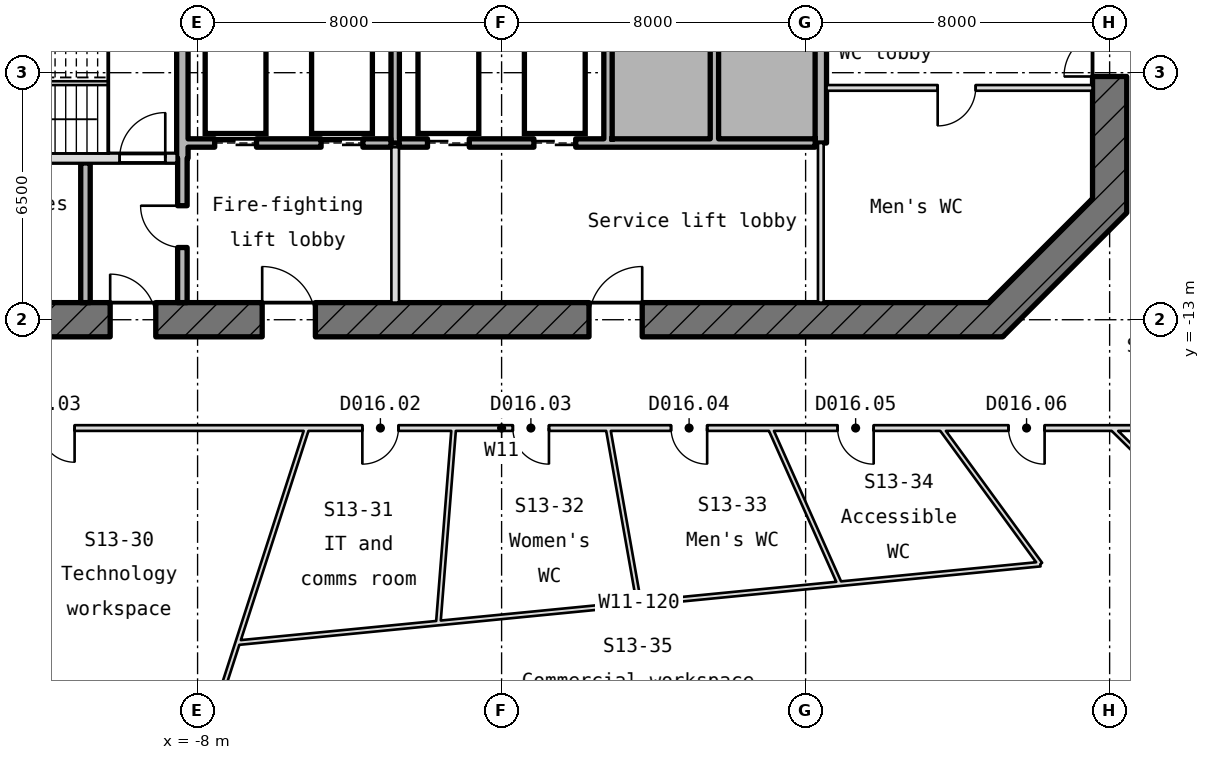
"""IFC4 building model, lengths in metres.
Left out: names, types, materials, properties, quantities, classifications, styles, units other than length and angle.
Written with IfcOpenShell. Run it as: python <this file> out.ifc"""

import sys

from ifc_helpers import new_model, si_unit, direction, frame, frame_2d, origin, place, context, subcontext, project, spatial, rectangle, extrude, element, fill, save


model = new_model("IFC4")
c1 = context("Model", 3, precision=1e-05, world=origin(), true_north=direction((0.0, 1.0)))
c2 = subcontext(c1, "Body", "Model", "MODEL_VIEW")
j1 = project(units=[si_unit("LENGTHUNIT", "METRE"), si_unit("PLANEANGLEUNIT", "RADIAN")], contexts=[c1])
p1 = place(None, origin())
s1 = spatial("IfcSite", under=j1, at=p1, CompositionType="ELEMENT")
p2 = place(p1, origin())
s2 = spatial("IfcBuilding", under=s1, at=p2, CompositionType="ELEMENT")
p3 = place(p2, frame((0.0, 0.0, 198.4)))
s3 = spatial("IfcBuildingStorey", under=s2, at=p3, CompositionType="ELEMENT", Elevation=198.4)
p4 = place(p3, frame((12.868, -13.132, -0.18), z_axis=(0.0, 0.0, 1.0), x_axis=(0.707106781187, 0.707106781187, 0.0)))
e1 = element("IfcWall", 1, at=p4, inside=s3, PredefinedType="SHEAR", context=c2, shape_type="SweptSolid", body=[
    extrude(rectangle(XDim=4.615, YDim=0.9, at=frame_2d((2.308, 0.0))), origin(), (0.0, 0.0, 1.0), 4.15),
])
p5 = place(p3, frame((16.0, -10.186, -0.18), z_axis=(0.0, 0.0, 1.0), x_axis=(0.0, 1.0, 0.0)))
e2 = element("IfcWall", 2, at=p5, inside=s3, PredefinedType="SHEAR", context=c2, shape_type="SweptSolid", body=[
    extrude(rectangle(XDim=20.373, YDim=0.9, at=frame_2d((10.186, 0.0))), origin(), (0.0, 0.0, 1.0), 4.15),
])
p6 = place(p5, frame((8.986, 0.0, 0.18)))
e3 = element("IfcOpeningElement", 3, at=p6, cuts=e2, PredefinedType="OPENING", context=c2, shape_type="SweptSolid", body=[
    extrude(rectangle(XDim=2.4, YDim=2.1, at=frame_2d((1.2, 1.05))), frame((0.0, 0.46, 0.0), z_axis=(0.0, -1.0, 0.0), x_axis=(1.0, 0.0, 0.0)), (0.0, 0.0, 1.0), 0.92),
])
p7 = place(p5, frame((13.586, 0.0, 0.18)))
e4 = element("IfcOpeningElement", 4, at=p7, cuts=e2, PredefinedType="OPENING", context=c2, shape_type="SweptSolid", body=[
    extrude(rectangle(XDim=1.2, YDim=2.1, at=frame_2d((0.6, 1.05))), frame((0.0, 0.46, 0.0), z_axis=(0.0, -1.0, 0.0), x_axis=(1.0, 0.0, 0.0)), (0.0, 0.0, 1.0), 0.92),
])
p8 = place(p5, frame((3.586, 0.0, 0.18)))
e5 = element("IfcOpeningElement", 5, at=p8, cuts=e2, PredefinedType="OPENING", context=c2, shape_type="SweptSolid", body=[
    extrude(rectangle(XDim=1.2, YDim=2.1, at=frame_2d((0.6, 1.05))), frame((0.0, 0.46, 0.0), z_axis=(0.0, -1.0, 0.0), x_axis=(1.0, 0.0, 0.0)), (0.0, 0.0, 1.0), 0.92),
])
p9 = place(p3, frame((-13.186, -13.0, -0.18), z_axis=(0.0, 0.0, 1.0), x_axis=(1.0, 0.0, 0.0)))
e6 = element("IfcWall", 6, at=p9, inside=s3, PredefinedType="SHEAR", context=c2, shape_type="SweptSolid", body=[
    extrude(rectangle(XDim=26.373, YDim=0.9, at=frame_2d((13.186, 0.0))), origin(), (0.0, 0.0, 1.0), 4.15),
])
p10 = place(p9, frame((2.886, 0.0, 0.18)))
e7 = element("IfcOpeningElement", 7, at=p10, cuts=e6, PredefinedType="OPENING", context=c2, shape_type="SweptSolid", body=[
    extrude(rectangle(XDim=1.2, YDim=2.1, at=frame_2d((0.6, 1.05))), frame((0.0, 0.46, 0.0), z_axis=(0.0, -1.0, 0.0), x_axis=(1.0, 0.0, 0.0)), (0.0, 0.0, 1.0), 0.92),
])
p11 = place(p9, frame((6.886, 0.0, 0.18)))
e8 = element("IfcOpeningElement", 8, at=p11, cuts=e6, PredefinedType="OPENING", context=c2, shape_type="SweptSolid", body=[
    extrude(rectangle(XDim=1.4, YDim=2.1, at=frame_2d((0.7, 1.05))), frame((0.0, 0.46, 0.0), z_axis=(0.0, -1.0, 0.0), x_axis=(1.0, 0.0, 0.0)), (0.0, 0.0, 1.0), 0.92),
])
p12 = place(p9, frame((15.486, 0.0, 0.18)))
e9 = element("IfcOpeningElement", 9, at=p12, cuts=e6, PredefinedType="OPENING", context=c2, shape_type="SweptSolid", body=[
    extrude(rectangle(XDim=1.4, YDim=2.1, at=frame_2d((0.7, 1.05))), frame((0.0, 0.46, 0.0), z_axis=(0.0, -1.0, 0.0), x_axis=(1.0, 0.0, 0.0)), (0.0, 0.0, 1.0), 0.92),
])
p13 = place(p3, frame((-15.55, -8.75, -0.18), z_axis=(0.0, 0.0, 1.0), x_axis=(1.0, 0.0, 0.0)))
e10 = element("IfcWall", 10, at=p13, inside=s3, PredefinedType="SHEAR", context=c2, shape_type="SweptSolid", body=[
    extrude(rectangle(XDim=7.0, YDim=0.25, at=frame_2d((3.5, 0.0))), origin(), (0.0, 0.0, 1.0), 4.15),
])
p14 = place(p13, frame((5.5, 0.0, 0.18)))
e11 = element("IfcOpeningElement", 11, at=p14, cuts=e10, PredefinedType="OPENING", context=c2, shape_type="SweptSolid", body=[
    extrude(rectangle(XDim=1.2, YDim=2.1, at=frame_2d((0.6, 1.05))), frame((0.0, 0.135, 0.0), z_axis=(0.0, -1.0, 0.0), x_axis=(1.0, 0.0, 0.0)), (0.0, 0.0, 1.0), 0.27),
])
p15 = place(p3, frame((-8.25, -8.35, 0.0), z_axis=(0.0, 0.0, 1.0), x_axis=(1.0, 0.0, 0.0)))
e12 = element("IfcWall", 12, at=p15, inside=s3, PredefinedType="STANDARD", context=c2, shape_type="SweptSolid", body=[
    extrude(rectangle(XDim=5.34, YDim=0.22, at=frame_2d((2.67, 0.0))), origin(), (0.0, 0.0, 1.0), 3.97),
])
p16 = place(p15, frame((0.7, 0.0, 0.0)))
e13 = element("IfcOpeningElement", 13, at=p16, cuts=e12, PredefinedType="OPENING", context=c2, shape_type="SweptSolid", body=[
    extrude(rectangle(XDim=1.1, YDim=2.1, at=frame_2d((0.55, 1.05))), frame((0.0, 0.12, 0.0), z_axis=(0.0, -1.0, 0.0), x_axis=(1.0, 0.0, 0.0)), (0.0, 0.0, 1.0), 0.24),
])
p17 = place(p15, frame((3.5, 0.0, 0.0)))
e14 = element("IfcOpeningElement", 14, at=p17, cuts=e12, PredefinedType="OPENING", context=c2, shape_type="SweptSolid", body=[
    extrude(rectangle(XDim=1.1, YDim=2.1, at=frame_2d((0.55, 1.05))), frame((0.0, 0.12, 0.0), z_axis=(0.0, -1.0, 0.0), x_axis=(1.0, 0.0, 0.0)), (0.0, 0.0, 1.0), 0.24),
])
p18 = place(p3, frame((-2.69, -8.35, 0.0), z_axis=(0.0, 0.0, 1.0), x_axis=(1.0, 0.0, 0.0)))
e15 = element("IfcWall", 15, at=p18, inside=s3, PredefinedType="STANDARD", context=c2, shape_type="SweptSolid", body=[
    extrude(rectangle(XDim=10.94, YDim=0.22, at=frame_2d((5.47, 0.0))), origin(), (0.0, 0.0, 1.0), 3.97),
])
p19 = place(p18, frame((0.74, 0.0, 0.0)))
e16 = element("IfcOpeningElement", 16, at=p19, cuts=e15, PredefinedType="OPENING", context=c2, shape_type="SweptSolid", body=[
    extrude(rectangle(XDim=1.1, YDim=2.1, at=frame_2d((0.55, 1.05))), frame((0.0, 0.12, 0.0), z_axis=(0.0, -1.0, 0.0), x_axis=(1.0, 0.0, 0.0)), (0.0, 0.0, 1.0), 0.24),
])
p20 = place(p18, frame((3.54, 0.0, 0.0)))
e17 = element("IfcOpeningElement", 17, at=p20, cuts=e15, PredefinedType="OPENING", context=c2, shape_type="SweptSolid", body=[
    extrude(rectangle(XDim=1.1, YDim=2.1, at=frame_2d((0.55, 1.05))), frame((0.0, 0.12, 0.0), z_axis=(0.0, -1.0, 0.0), x_axis=(1.0, 0.0, 0.0)), (0.0, 0.0, 1.0), 0.24),
])
p21 = place(p3, frame((8.55, -6.9, 0.0), z_axis=(0.0, 0.0, 1.0), x_axis=(1.0, 0.0, 0.0)))
e18 = element("IfcWall", 18, at=p21, inside=s3, PredefinedType="PARTITIONING", context=c2, shape_type="SweptSolid", body=[
    extrude(rectangle(XDim=7.0, YDim=0.15, at=frame_2d((3.5, 0.0))), origin(), (0.0, 0.0, 1.0), 3.97),
])
p22 = place(p21, frame((2.925, 0.0, 0.0)))
e19 = element("IfcOpeningElement", 19, at=p22, cuts=e18, PredefinedType="OPENING", context=c2, shape_type="SweptSolid", body=[
    extrude(rectangle(XDim=1.0, YDim=2.1, at=frame_2d((0.5, 1.05))), frame((0.0, 0.085, 0.0), z_axis=(0.0, -1.0, 0.0), x_axis=(1.0, 0.0, 0.0)), (0.0, 0.0, 1.0), 0.17),
])
p23 = place(p3, frame((-10.95, -12.55, 0.0), z_axis=(0.0, 0.0, 1.0), x_axis=(0.0, 1.0, 0.0)))
e20 = element("IfcWall", 20, at=p23, inside=s3, PredefinedType="STANDARD", context=c2, shape_type="SweptSolid", body=[
    extrude(rectangle(XDim=3.675, YDim=0.25, at=frame_2d((1.837, 0.0))), origin(), (0.0, 0.0, 1.0), 3.97),
])
p24 = place(p3, frame((-8.4, -12.55, 0.0), z_axis=(0.0, 0.0, 1.0), x_axis=(0.0, 1.0, 0.0)))
e21 = element("IfcWall", 21, at=p24, inside=s3, PredefinedType="STANDARD", context=c2, shape_type="SweptSolid", body=[
    extrude(rectangle(XDim=3.8, YDim=0.25, at=frame_2d((1.9, 0.0))), origin(), (0.0, 0.0, 1.0), 3.97),
])
p25 = place(p24, frame((1.45, 0.0, 0.0)))
e22 = element("IfcOpeningElement", 22, at=p25, cuts=e21, PredefinedType="OPENING", context=c2, shape_type="SweptSolid", body=[
    extrude(rectangle(XDim=1.1, YDim=2.1, at=frame_2d((0.55, 1.05))), frame((0.0, 0.135, 0.0), z_axis=(0.0, -1.0, 0.0), x_axis=(1.0, 0.0, 0.0)), (0.0, 0.0, 1.0), 0.27),
])
p26 = place(p3, frame((-8.4, -8.75, -0.18), z_axis=(0.0, 0.0, 1.0), x_axis=(0.0, 1.0, 0.0)))
e23 = element("IfcWall", 23, at=p26, inside=s3, PredefinedType="SHEAR", context=c2, shape_type="SweptSolid", body=[
    extrude(rectangle(XDim=6.25, YDim=0.3, at=frame_2d((3.125, 0.0))), origin(), (0.0, 0.0, 1.0), 4.15),
])
p27 = place(p3, frame((-2.8, -12.55, 0.0), z_axis=(0.0, 0.0, 1.0), x_axis=(0.0, 1.0, 0.0)))
e24 = element("IfcWall", 24, at=p27, inside=s3, PredefinedType="PARTITIONING", context=c2, shape_type="SweptSolid", body=[
    extrude(rectangle(XDim=4.09, YDim=0.2, at=frame_2d((2.045, 0.0))), origin(), (0.0, 0.0, 1.0), 3.97),
])
p28 = place(p3, frame((-2.8, -8.35, 0.0), z_axis=(0.0, 0.0, 1.0), x_axis=(0.0, 1.0, 0.0)))
e25 = element("IfcWall", 25, at=p28, inside=s3, PredefinedType="STANDARD", context=c2, shape_type="SweptSolid", body=[
    extrude(rectangle(XDim=2.89, YDim=0.22, at=frame_2d((1.445, 0.0))), origin(), (0.0, 0.0, 1.0), 3.97),
])
for number, where, z_axis, x_axis in (
    (26, (2.8, -8.24, 0.0), (0.0, 0.0, 1.0), (0.0, 1.0, 0.0)),
    (27, (5.6, -8.24, 0.0), (0.0, 0.0, 1.0), (0.0, 1.0, 0.0)),
):
    element("IfcWall", number, at=place(p3, frame(where, z_axis=z_axis, x_axis=x_axis)), inside=s3, PredefinedType="STANDARD", context=c2, shape_type="SweptSolid", body=[
        extrude(rectangle(XDim=2.78, YDim=0.22, at=frame_2d((1.39, 0.0))), origin(), (0.0, 0.0, 1.0), 3.97),
    ])
p29 = place(p3, frame((8.4, -12.55, 0.0), z_axis=(0.0, 0.0, 1.0), x_axis=(0.0, 1.0, 0.0)))
e28 = element("IfcWall", 28, at=p29, inside=s3, PredefinedType="PARTITIONING", context=c2, shape_type="SweptSolid", body=[
    extrude(rectangle(XDim=4.2, YDim=0.15, at=frame_2d((2.1, 0.0))), origin(), (0.0, 0.0, 1.0), 3.97),
])
p30 = place(p3, frame((8.4, -8.35, -0.18), z_axis=(0.0, 0.0, 1.0), x_axis=(0.0, 1.0, 0.0)))
e29 = element("IfcWall", 29, at=p30, inside=s3, PredefinedType="SHEAR", context=c2, shape_type="SweptSolid", body=[
    extrude(rectangle(XDim=5.85, YDim=0.3, at=frame_2d((2.925, 0.0))), origin(), (0.0, 0.0, 1.0), 4.15),
])
p31 = place(p3, frame((-6.946, -21.498, 0.0), z_axis=(0.0, 0.0, 1.0), x_axis=(0.995245004441, 0.097403188531, 0.0)))
e30 = element("IfcWall", 30, at=p31, inside=s3, PredefinedType="PARTITIONING", context=c2, shape_type="SweptSolid", body=[
    extrude(rectangle(XDim=21.222, YDim=0.12, at=frame_2d((10.611, 0.0))), origin(), (0.0, 0.0, 1.0), 3.97),
])
p32 = place(p3, frame((-5.121, -15.85, 0.0), z_axis=(0.0, 0.0, 1.0), x_axis=(-0.30745280962, -0.951563329399, 0.0)))
e31 = element("IfcWall", 31, at=p32, inside=s3, PredefinedType="PARTITIONING", context=c2, shape_type="SweptSolid", body=[
    extrude(rectangle(XDim=8.226, YDim=0.12, at=frame_2d((4.113, 0.0))), origin(), (0.0, 0.0, 1.0), 3.434),
])
p33 = place(p3, frame((-1.666, -20.981, 0.0), z_axis=(0.0, 0.0, 1.0), x_axis=(0.07911181221, 0.996865748819, 0.0)))
e32 = element("IfcWall", 32, at=p33, inside=s3, PredefinedType="PARTITIONING", context=c2, shape_type="SweptSolid", body=[
    extrude(rectangle(XDim=5.147, YDim=0.12, at=frame_2d((2.574, 0.0))), origin(), (0.0, 0.0, 1.0), 3.97),
])
p34 = place(p3, frame((3.615, -20.465, 0.0), z_axis=(0.0, 0.0, 1.0), x_axis=(-0.173913137247, 0.984760996736, 0.0)))
e33 = element("IfcWall", 33, at=p34, inside=s3, PredefinedType="PARTITIONING", context=c2, shape_type="SweptSolid", body=[
    extrude(rectangle(XDim=4.686, YDim=0.12, at=frame_2d((2.343, 0.0))), origin(), (0.0, 0.0, 1.0), 3.97),
])
p35 = place(p3, frame((8.895, -19.948, 0.0), z_axis=(0.0, 0.0, 1.0), x_axis=(-0.407228685497, 0.913326227428, 0.0)))
e34 = element("IfcWall", 34, at=p35, inside=s3, PredefinedType="PARTITIONING", context=c2, shape_type="SweptSolid", body=[
    extrude(rectangle(XDim=4.487, YDim=0.12, at=frame_2d((2.243, 0.0))), origin(), (0.0, 0.0, 1.0), 3.97),
])
p36 = place(p3, frame((14.176, -19.431, 0.0), z_axis=(0.0, 0.0, 1.0), x_axis=(-0.589372905267, 0.807861113396, 0.0)))
e35 = element("IfcWall", 35, at=p36, inside=s3, PredefinedType="PARTITIONING", context=c2, shape_type="SweptSolid", body=[
    extrude(rectangle(XDim=4.433, YDim=0.12, at=frame_2d((2.216, 0.0))), origin(), (0.0, 0.0, 1.0), 3.97),
])
p37 = place(p3, frame((16.064, -15.85, 0.0), z_axis=(0.0, 0.0, 1.0), x_axis=(0.71183576694, -0.702345955284, 0.0)))
e36 = element("IfcWall", 36, at=p37, inside=s3, PredefinedType="PARTITIONING", context=c2, shape_type="SweptSolid", body=[
    extrude(rectangle(XDim=7.332, YDim=0.12, at=frame_2d((3.666, 0.0))), origin(), (0.0, 0.0, 1.0), 3.97),
])
p38 = place(p3, frame((19.15, -15.85, 0.0), z_axis=(0.0, 0.0, 1.0), x_axis=(-1.0, 0.0, 0.0)))
e37 = element("IfcWall", 37, at=p38, inside=s3, PredefinedType="PARTITIONING", context=c2, shape_type="SweptSolid", body=[
    extrude(rectangle(XDim=38.3, YDim=0.15, at=frame_2d((19.15, 0.0))), origin(), (0.0, 0.0, 1.0), 3.97),
])
p39 = place(p38, frame((30.386, 0.0, 0.0)))
e38 = element("IfcOpeningElement", 38, at=p39, cuts=e37, PredefinedType="OPENING", context=c2, shape_type="SweptSolid", body=[
    extrude(rectangle(XDim=1.8, YDim=2.1, at=frame_2d((0.9, 1.05))), frame((0.0, 0.085, 0.0), z_axis=(0.0, -1.0, 0.0), x_axis=(1.0, 0.0, 0.0)), (0.0, 0.0, 1.0), 0.17),
])
p40 = place(p38, frame((21.864, 0.0, 0.0)))
e39 = element("IfcOpeningElement", 39, at=p40, cuts=e37, PredefinedType="OPENING", context=c2, shape_type="SweptSolid", body=[
    extrude(rectangle(XDim=0.95, YDim=2.1, at=frame_2d((0.475, 1.05))), frame((0.0, 0.085, 0.0), z_axis=(0.0, -1.0, 0.0), x_axis=(1.0, 0.0, 0.0)), (0.0, 0.0, 1.0), 0.17),
])
p41 = place(p38, frame((17.904, 0.0, 0.0)))
e40 = element("IfcOpeningElement", 40, at=p41, cuts=e37, PredefinedType="OPENING", context=c2, shape_type="SweptSolid", body=[
    extrude(rectangle(XDim=0.95, YDim=2.1, at=frame_2d((0.475, 1.05))), frame((0.0, 0.085, 0.0), z_axis=(0.0, -1.0, 0.0), x_axis=(1.0, 0.0, 0.0)), (0.0, 0.0, 1.0), 0.17),
])
p42 = place(p38, frame((13.741, 0.0, 0.0)))
e41 = element("IfcOpeningElement", 41, at=p42, cuts=e37, PredefinedType="OPENING", context=c2, shape_type="SweptSolid", body=[
    extrude(rectangle(XDim=0.95, YDim=2.1, at=frame_2d((0.475, 1.05))), frame((0.0, 0.085, 0.0), z_axis=(0.0, -1.0, 0.0), x_axis=(1.0, 0.0, 0.0)), (0.0, 0.0, 1.0), 0.17),
])
p43 = place(p38, frame((9.359, 0.0, 0.0)))
e42 = element("IfcOpeningElement", 42, at=p43, cuts=e37, PredefinedType="OPENING", context=c2, shape_type="SweptSolid", body=[
    extrude(rectangle(XDim=0.95, YDim=2.1, at=frame_2d((0.475, 1.05))), frame((0.0, 0.085, 0.0), z_axis=(0.0, -1.0, 0.0), x_axis=(1.0, 0.0, 0.0)), (0.0, 0.0, 1.0), 0.17),
])
p44 = place(p38, frame((4.861, 0.0, 0.0)))
e43 = element("IfcOpeningElement", 43, at=p44, cuts=e37, PredefinedType="OPENING", context=c2, shape_type="SweptSolid", body=[
    extrude(rectangle(XDim=0.95, YDim=2.1, at=frame_2d((0.475, 1.05))), frame((0.0, 0.085, 0.0), z_axis=(0.0, -1.0, 0.0), x_axis=(1.0, 0.0, 0.0)), (0.0, 0.0, 1.0), 0.17),
])
p45 = place(p16, origin())
e44 = element("IfcDoor", 44, at=p45, inside=s3, OperationType="DOUBLE_DOOR_SLIDING", PredefinedType="DOOR", context=c2, shape_type="SweptSolid", body=[
    extrude(rectangle(XDim=1.1, YDim=2.1, at=frame_2d((0.55, 1.05))), frame((0.0, 0.025, 0.0), z_axis=(0.0, -1.0, 0.0), x_axis=(1.0, 0.0, 0.0)), (0.0, 0.0, 1.0), 0.05),
])
fill(e13, e44)
p46 = place(p17, origin())
e45 = element("IfcDoor", 45, at=p46, inside=s3, OperationType="DOUBLE_DOOR_SLIDING", PredefinedType="DOOR", context=c2, shape_type="SweptSolid", body=[
    extrude(rectangle(XDim=1.1, YDim=2.1, at=frame_2d((0.55, 1.05))), frame((0.0, 0.025, 0.0), z_axis=(0.0, -1.0, 0.0), x_axis=(1.0, 0.0, 0.0)), (0.0, 0.0, 1.0), 0.05),
])
fill(e14, e45)
p47 = place(p19, origin())
e46 = element("IfcDoor", 46, at=p47, inside=s3, OperationType="DOUBLE_DOOR_SLIDING", PredefinedType="DOOR", context=c2, shape_type="SweptSolid", body=[
    extrude(rectangle(XDim=1.1, YDim=2.1, at=frame_2d((0.55, 1.05))), frame((0.0, 0.025, 0.0), z_axis=(0.0, -1.0, 0.0), x_axis=(1.0, 0.0, 0.0)), (0.0, 0.0, 1.0), 0.05),
])
fill(e16, e46)
p48 = place(p20, origin())
e47 = element("IfcDoor", 47, at=p48, inside=s3, OperationType="DOUBLE_DOOR_SLIDING", PredefinedType="DOOR", context=c2, shape_type="SweptSolid", body=[
    extrude(rectangle(XDim=1.1, YDim=2.1, at=frame_2d((0.55, 1.05))), frame((0.0, 0.025, 0.0), z_axis=(0.0, -1.0, 0.0), x_axis=(1.0, 0.0, 0.0)), (0.0, 0.0, 1.0), 0.05),
])
fill(e17, e47)
p49 = place(p14, origin())
e48 = element("IfcDoor", 48, at=p49, inside=s3, OperationType="SINGLE_SWING_RIGHT", PredefinedType="DOOR", context=c2, shape_type="SweptSolid", body=[
    extrude(rectangle(XDim=1.2, YDim=2.1, at=frame_2d((0.6, 1.05))), frame((0.0, 0.025, 0.0), z_axis=(0.0, -1.0, 0.0), x_axis=(1.0, 0.0, 0.0)), (0.0, 0.0, 1.0), 0.05),
])
fill(e11, e48)
p50 = place(p25, origin())
e49 = element("IfcDoor", 49, at=p50, inside=s3, OperationType="SINGLE_SWING_RIGHT", PredefinedType="DOOR", context=c2, shape_type="SweptSolid", body=[
    extrude(rectangle(XDim=1.1, YDim=2.1, at=frame_2d((0.55, 1.05))), frame((0.0, 0.025, 0.0), z_axis=(0.0, -1.0, 0.0), x_axis=(1.0, 0.0, 0.0)), (0.0, 0.0, 1.0), 0.05),
])
fill(e22, e49)
p51 = place(p10, origin())
e50 = element("IfcDoor", 50, at=p51, inside=s3, OperationType="SINGLE_SWING_RIGHT", PredefinedType="DOOR", context=c2, shape_type="SweptSolid", body=[
    extrude(rectangle(XDim=1.2, YDim=2.1, at=frame_2d((0.6, 1.05))), frame((0.0, 0.025, 0.0), z_axis=(0.0, -1.0, 0.0), x_axis=(1.0, 0.0, 0.0)), (0.0, 0.0, 1.0), 0.05),
])
fill(e7, e50)
p52 = place(p11, origin())
e51 = element("IfcDoor", 51, at=p52, inside=s3, OperationType="SINGLE_SWING_RIGHT", PredefinedType="DOOR", context=c2, shape_type="SweptSolid", body=[
    extrude(rectangle(XDim=1.4, YDim=2.1, at=frame_2d((0.7, 1.05))), frame((0.0, 0.025, 0.0), z_axis=(0.0, -1.0, 0.0), x_axis=(1.0, 0.0, 0.0)), (0.0, 0.0, 1.0), 0.05),
])
fill(e8, e51)
p53 = place(p12, origin())
e52 = element("IfcDoor", 52, at=p53, inside=s3, OperationType="SINGLE_SWING_RIGHT", PredefinedType="DOOR", context=c2, shape_type="SweptSolid", body=[
    extrude(rectangle(XDim=1.4, YDim=2.1, at=frame_2d((0.7, 1.05))), frame((0.0, 0.025, 0.0), z_axis=(0.0, -1.0, 0.0), x_axis=(1.0, 0.0, 0.0)), (0.0, 0.0, 1.0), 0.05),
])
fill(e9, e52)
p54 = place(p8, origin())
e53 = element("IfcDoor", 53, at=p54, inside=s3, OperationType="SINGLE_SWING_RIGHT", PredefinedType="DOOR", context=c2, shape_type="SweptSolid", body=[
    extrude(rectangle(XDim=1.2, YDim=2.1, at=frame_2d((0.6, 1.05))), frame((0.0, 0.025, 0.0), z_axis=(0.0, -1.0, 0.0), x_axis=(1.0, 0.0, 0.0)), (0.0, 0.0, 1.0), 0.05),
])
fill(e5, e53)
p55 = place(p22, frame((1.0, 0.0, 0.0), z_axis=(0.0, 0.0, 1.0), x_axis=(-1.0, 0.0, 0.0)))
e54 = element("IfcDoor", 54, at=p55, inside=s3, OperationType="SINGLE_SWING_LEFT", PredefinedType="DOOR", context=c2, shape_type="SweptSolid", body=[
    extrude(rectangle(XDim=1.0, YDim=2.1, at=frame_2d((0.5, 1.05))), frame((0.0, 0.025, 0.0), z_axis=(0.0, -1.0, 0.0), x_axis=(1.0, 0.0, 0.0)), (0.0, 0.0, 1.0), 0.05),
])
fill(e19, e54)
p56 = place(p39, origin())
e55 = element("IfcDoor", 55, at=p56, inside=s3, OperationType="DOUBLE_DOOR_SINGLE_SWING", PredefinedType="DOOR", context=c2, shape_type="SweptSolid", body=[
    extrude(rectangle(XDim=1.8, YDim=2.1, at=frame_2d((0.9, 1.05))), frame((0.0, 0.025, 0.0), z_axis=(0.0, -1.0, 0.0), x_axis=(1.0, 0.0, 0.0)), (0.0, 0.0, 1.0), 0.05),
])
fill(e38, e55)
p57 = place(p40, origin())
e56 = element("IfcDoor", 56, at=p57, inside=s3, OperationType="SINGLE_SWING_RIGHT", PredefinedType="DOOR", context=c2, shape_type="SweptSolid", body=[
    extrude(rectangle(XDim=0.95, YDim=2.1, at=frame_2d((0.475, 1.05))), frame((0.0, 0.025, 0.0), z_axis=(0.0, -1.0, 0.0), x_axis=(1.0, 0.0, 0.0)), (0.0, 0.0, 1.0), 0.05),
])
fill(e39, e56)
p58 = place(p41, origin())
e57 = element("IfcDoor", 57, at=p58, inside=s3, OperationType="SINGLE_SWING_RIGHT", PredefinedType="DOOR", context=c2, shape_type="SweptSolid", body=[
    extrude(rectangle(XDim=0.95, YDim=2.1, at=frame_2d((0.475, 1.05))), frame((0.0, 0.025, 0.0), z_axis=(0.0, -1.0, 0.0), x_axis=(1.0, 0.0, 0.0)), (0.0, 0.0, 1.0), 0.05),
])
fill(e40, e57)
p59 = place(p42, origin())
e58 = element("IfcDoor", 58, at=p59, inside=s3, OperationType="SINGLE_SWING_RIGHT", PredefinedType="DOOR", context=c2, shape_type="SweptSolid", body=[
    extrude(rectangle(XDim=0.95, YDim=2.1, at=frame_2d((0.475, 1.05))), frame((0.0, 0.025, 0.0), z_axis=(0.0, -1.0, 0.0), x_axis=(1.0, 0.0, 0.0)), (0.0, 0.0, 1.0), 0.05),
])
fill(e41, e58)
p60 = place(p43, origin())
e59 = element("IfcDoor", 59, at=p60, inside=s3, OperationType="SINGLE_SWING_RIGHT", PredefinedType="DOOR", context=c2, shape_type="SweptSolid", body=[
    extrude(rectangle(XDim=0.95, YDim=2.1, at=frame_2d((0.475, 1.05))), frame((0.0, 0.025, 0.0), z_axis=(0.0, -1.0, 0.0), x_axis=(1.0, 0.0, 0.0)), (0.0, 0.0, 1.0), 0.05),
])
fill(e42, e59)
p61 = place(p44, origin())
e60 = element("IfcDoor", 60, at=p61, inside=s3, OperationType="SINGLE_SWING_RIGHT", PredefinedType="DOOR", context=c2, shape_type="SweptSolid", body=[
    extrude(rectangle(XDim=0.95, YDim=2.1, at=frame_2d((0.475, 1.05))), frame((0.0, 0.025, 0.0), z_axis=(0.0, -1.0, 0.0), x_axis=(1.0, 0.0, 0.0)), (0.0, 0.0, 1.0), 0.05),
])
fill(e43, e60)
save(model, sys.argv[1])
